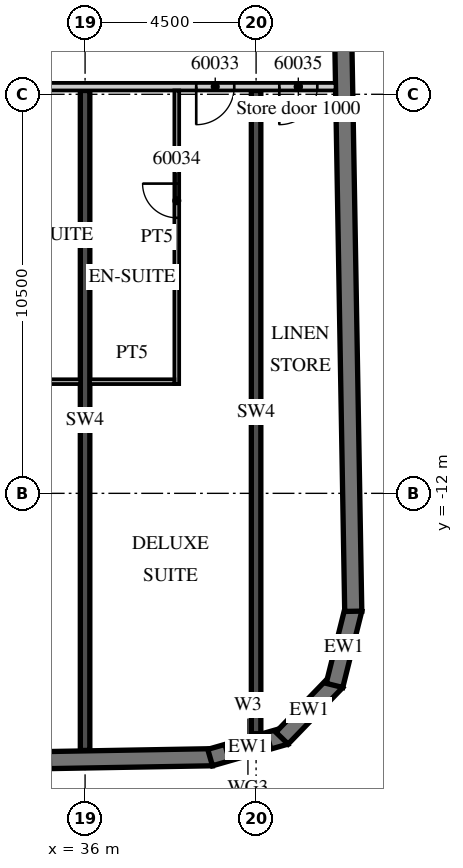
"""IFC4 building model, lengths in metres.
Left out: names, types, materials, properties, quantities, classifications, styles, units other than length and angle.
Written with IfcOpenShell. Run it as: python <this file> out.ifc"""

import sys

from ifc_helpers import new_model, si_unit, direction, frame, frame_2d, origin, place, context, subcontext, project, spatial, polyline, rectangle, outline, extrude, element, fill, save


model = new_model("IFC4")
c1 = context("Model", 3, precision=1e-05, world=origin(), true_north=direction((0.0, 1.0)))
c2 = subcontext(c1, "Body", "Model", "MODEL_VIEW")
j1 = project(units=[si_unit("LENGTHUNIT", "METRE"), si_unit("PLANEANGLEUNIT", "RADIAN")], contexts=[c1])
p1 = place(None, origin())
s1 = spatial("IfcSite", under=j1, at=p1, CompositionType="ELEMENT")
p2 = place(p1, origin())
s2 = spatial("IfcBuilding", under=s1, at=p2, CompositionType="ELEMENT")
p3 = place(p2, frame((0.0, 0.0, 244.1)))
s3 = spatial("IfcBuildingStorey", under=s2, at=p3, CompositionType="ELEMENT", Elevation=244.1)
p4 = place(p3, frame((36.0, -18.765, 0.0), z_axis=(0.0, 0.0, 1.0), x_axis=(0.0, 1.0, 0.0)))
e1 = element("IfcWall", 1, at=p4, inside=s3, PredefinedType="SHEAR", context=c2, shape_type="SweptSolid", body=[
    extrude(rectangle(XDim=17.365, YDim=0.25, at=frame_2d((8.683, 0.0))), origin(), (0.0, 0.0, 1.0), 3.3),
])
p5 = place(p3, frame((40.5, -18.325, 0.0), z_axis=(0.0, 0.0, 1.0), x_axis=(0.0, 1.0, 0.0)))
e2 = element("IfcWall", 2, at=p5, inside=s3, PredefinedType="SHEAR", context=c2, shape_type="SweptSolid", body=[
    extrude(rectangle(XDim=16.925, YDim=0.25, at=frame_2d((8.463, 0.0))), origin(), (0.0, 0.0, 1.0), 3.3),
])
p6 = place(p3, frame((-13.504, -19.866, 0.0), z_axis=(0.0, 0.0, 1.0), x_axis=(0.999847672978, 0.017453676992, 0.0)))
e3 = element("IfcWall", 3, at=p6, inside=s3, PredefinedType="SOLIDWALL", context=c2, shape_type="SweptSolid", body=[
    extrude(rectangle(XDim=52.86, YDim=0.45, at=frame_2d((26.43, 0.0))), origin(), (0.0, 0.0, 1.0), 3.02),
])
p7 = place(p6, frame((0.9, 0.0, 0.45)))
e4 = element("IfcOpeningElement", 4, at=p7, cuts=e3, PredefinedType="OPENING", context=c2, shape_type="SweptSolid", body=[
    extrude(rectangle(XDim=2.7, YDim=2.25, at=frame_2d((1.35, 1.125))), frame((0.0, 0.235, 0.0), z_axis=(0.0, -1.0, 0.0), x_axis=(1.0, 0.0, 0.0)), (0.0, 0.0, 1.0), 0.47),
])
p8 = place(p6, frame((5.401, 0.0, 0.45)))
e5 = element("IfcOpeningElement", 5, at=p8, cuts=e3, PredefinedType="OPENING", context=c2, shape_type="SweptSolid", body=[
    extrude(rectangle(XDim=2.7, YDim=2.25, at=frame_2d((1.35, 1.125))), frame((0.0, 0.235, 0.0), z_axis=(0.0, -1.0, 0.0), x_axis=(1.0, 0.0, 0.0)), (0.0, 0.0, 1.0), 0.47),
])
p9 = place(p6, frame((9.902, 0.0, 0.45)))
e6 = element("IfcOpeningElement", 6, at=p9, cuts=e3, PredefinedType="OPENING", context=c2, shape_type="SweptSolid", body=[
    extrude(rectangle(XDim=2.7, YDim=2.25, at=frame_2d((1.35, 1.125))), frame((0.0, 0.235, 0.0), z_axis=(0.0, -1.0, 0.0), x_axis=(1.0, 0.0, 0.0)), (0.0, 0.0, 1.0), 0.47),
])
p10 = place(p6, frame((14.402, 0.0, 0.45)))
e7 = element("IfcOpeningElement", 7, at=p10, cuts=e3, PredefinedType="OPENING", context=c2, shape_type="SweptSolid", body=[
    extrude(rectangle(XDim=2.7, YDim=2.25, at=frame_2d((1.35, 1.125))), frame((0.0, 0.235, 0.0), z_axis=(0.0, -1.0, 0.0), x_axis=(1.0, 0.0, 0.0)), (0.0, 0.0, 1.0), 0.47),
])
p11 = place(p6, frame((18.903, 0.0, 0.45)))
e8 = element("IfcOpeningElement", 8, at=p11, cuts=e3, PredefinedType="OPENING", context=c2, shape_type="SweptSolid", body=[
    extrude(rectangle(XDim=2.7, YDim=2.25, at=frame_2d((1.35, 1.125))), frame((0.0, 0.235, 0.0), z_axis=(0.0, -1.0, 0.0), x_axis=(1.0, 0.0, 0.0)), (0.0, 0.0, 1.0), 0.47),
])
p12 = place(p6, frame((23.404, 0.0, 0.45)))
e9 = element("IfcOpeningElement", 9, at=p12, cuts=e3, PredefinedType="OPENING", context=c2, shape_type="SweptSolid", body=[
    extrude(rectangle(XDim=2.7, YDim=2.25, at=frame_2d((1.35, 1.125))), frame((0.0, 0.235, 0.0), z_axis=(0.0, -1.0, 0.0), x_axis=(1.0, 0.0, 0.0)), (0.0, 0.0, 1.0), 0.47),
])
p13 = place(p6, frame((27.904, 0.0, 0.45)))
e10 = element("IfcOpeningElement", 10, at=p13, cuts=e3, PredefinedType="OPENING", context=c2, shape_type="SweptSolid", body=[
    extrude(rectangle(XDim=2.7, YDim=2.25, at=frame_2d((1.35, 1.125))), frame((0.0, 0.235, 0.0), z_axis=(0.0, -1.0, 0.0), x_axis=(1.0, 0.0, 0.0)), (0.0, 0.0, 1.0), 0.47),
])
p14 = place(p6, frame((32.405, 0.0, 0.45)))
e11 = element("IfcOpeningElement", 11, at=p14, cuts=e3, PredefinedType="OPENING", context=c2, shape_type="SweptSolid", body=[
    extrude(rectangle(XDim=2.7, YDim=2.25, at=frame_2d((1.35, 1.125))), frame((0.0, 0.235, 0.0), z_axis=(0.0, -1.0, 0.0), x_axis=(1.0, 0.0, 0.0)), (0.0, 0.0, 1.0), 0.47),
])
p15 = place(p6, frame((36.906, 0.0, 0.45)))
e12 = element("IfcOpeningElement", 12, at=p15, cuts=e3, PredefinedType="OPENING", context=c2, shape_type="SweptSolid", body=[
    extrude(rectangle(XDim=2.7, YDim=2.25, at=frame_2d((1.35, 1.125))), frame((0.0, 0.235, 0.0), z_axis=(0.0, -1.0, 0.0), x_axis=(1.0, 0.0, 0.0)), (0.0, 0.0, 1.0), 0.47),
])
p16 = place(p6, frame((41.406, 0.0, 0.45)))
e13 = element("IfcOpeningElement", 13, at=p16, cuts=e3, PredefinedType="OPENING", context=c2, shape_type="SweptSolid", body=[
    extrude(rectangle(XDim=2.7, YDim=2.25, at=frame_2d((1.35, 1.125))), frame((0.0, 0.235, 0.0), z_axis=(0.0, -1.0, 0.0), x_axis=(1.0, 0.0, 0.0)), (0.0, 0.0, 1.0), 0.47),
])
p17 = place(p6, frame((45.907, 0.0, 0.45)))
e14 = element("IfcOpeningElement", 14, at=p17, cuts=e3, PredefinedType="OPENING", context=c2, shape_type="SweptSolid", body=[
    extrude(rectangle(XDim=2.7, YDim=2.25, at=frame_2d((1.35, 1.125))), frame((0.0, 0.235, 0.0), z_axis=(0.0, -1.0, 0.0), x_axis=(1.0, 0.0, 0.0)), (0.0, 0.0, 1.0), 0.47),
])
p18 = place(p3, frame((39.29, -18.952, 0.0), z_axis=(0.0, 0.0, 1.0), x_axis=(0.961247584925, 0.275686562016, 0.0)))
e15 = element("IfcWall", 15, at=p18, inside=s3, PredefinedType="SOLIDWALL", context=c2, shape_type="SweptSolid", body=[
    extrude(outline(polyline([(0.0, -0.225), (2.071, -0.225), (1.95, 0.225), (0.121, 0.225), (0.0, -0.225)])), origin(), (0.0, 0.0, 1.0), 3.02),
])
p19 = place(p18, frame((0.435, 0.0, 0.45)))
e16 = element("IfcOpeningElement", 16, at=p19, cuts=e15, PredefinedType="OPENING", context=c2, shape_type="SweptSolid", body=[
    extrude(rectangle(XDim=1.2, YDim=2.25, at=frame_2d((0.6, 1.125))), frame((0.0, 0.235, 0.0), z_axis=(0.0, -1.0, 0.0), x_axis=(1.0, 0.0, 0.0)), (0.0, 0.0, 1.0), 0.47),
])
p20 = place(p3, frame((41.181, -18.442, 0.0), z_axis=(0.0, 0.0, 1.0), x_axis=(0.694678672846, 0.719320193998, 0.0)))
e17 = element("IfcWall", 17, at=p20, inside=s3, PredefinedType="SOLIDWALL", context=c2, shape_type="SweptSolid", body=[
    extrude(outline(polyline([(0.0, -0.225), (2.071, -0.225), (1.95, 0.225), (0.121, 0.225), (0.0, -0.225)])), origin(), (0.0, 0.0, 1.0), 3.02),
])
p21 = place(p3, frame((42.563, -17.054, 0.0), z_axis=(0.0, 0.0, 1.0), x_axis=(0.241841950319, 0.970315655375, 0.0)))
e18 = element("IfcWall", 18, at=p21, inside=s3, PredefinedType="SOLIDWALL", context=c2, shape_type="SweptSolid", body=[
    extrude(outline(polyline([(0.0, -0.225), (2.071, -0.225), (1.95, 0.225), (0.121, 0.225), (0.0, -0.225)])), origin(), (0.0, 0.0, 1.0), 3.02),
])
p22 = place(p3, frame((43.057, -15.103, 0.0), z_axis=(0.0, 0.0, 1.0), x_axis=(-0.017452408953, 0.999847695112, 0.0)))
e19 = element("IfcWall", 19, at=p22, inside=s3, PredefinedType="SOLIDWALL", context=c2, shape_type="SweptSolid", body=[
    extrude(rectangle(XDim=33.0, YDim=0.45, at=frame_2d((16.5, 0.0))), origin(), (0.0, 0.0, 1.0), 3.02),
])
p23 = place(p3, frame((13.5, -1.3, 0.0), z_axis=(0.0, 0.0, 1.0), x_axis=(1.0, 0.0, 0.0)))
e20 = element("IfcWall", 20, at=p23, inside=s3, PredefinedType="PARTITIONING", context=c2, shape_type="SweptSolid", body=[
    extrude(rectangle(XDim=29.091, YDim=0.2, at=frame_2d((14.545, 0.0))), origin(), (0.0, 0.0, 1.0), 3.02),
])
p24 = place(p23, frame((0.575, 0.0, 0.0)))
e21 = element("IfcOpeningElement", 21, at=p24, cuts=e20, PredefinedType="OPENING", context=c2, shape_type="SweptSolid", body=[
    extrude(rectangle(XDim=1.0, YDim=2.1, at=frame_2d((0.5, 1.05))), frame((0.0, 0.11, 0.0), z_axis=(0.0, -1.0, 0.0), x_axis=(1.0, 0.0, 0.0)), (0.0, 0.0, 1.0), 0.22),
])
p25 = place(p23, frame((6.938, 0.0, 0.0)))
e22 = element("IfcOpeningElement", 22, at=p25, cuts=e20, PredefinedType="OPENING", context=c2, shape_type="SweptSolid", body=[
    extrude(rectangle(XDim=1.2, YDim=2.1, at=frame_2d((0.6, 1.05))), frame((0.0, 0.11, 0.0), z_axis=(0.0, -1.0, 0.0), x_axis=(1.0, 0.0, 0.0)), (0.0, 0.0, 1.0), 0.22),
])
p26 = place(p23, frame((15.938, 0.0, 0.0)))
e23 = element("IfcOpeningElement", 23, at=p26, cuts=e20, PredefinedType="OPENING", context=c2, shape_type="SweptSolid", body=[
    extrude(rectangle(XDim=1.2, YDim=2.1, at=frame_2d((0.6, 1.05))), frame((0.0, 0.11, 0.0), z_axis=(0.0, -1.0, 0.0), x_axis=(1.0, 0.0, 0.0)), (0.0, 0.0, 1.0), 0.22),
])
p27 = place(p23, frame((25.425, 0.0, 0.0)))
e24 = element("IfcOpeningElement", 24, at=p27, cuts=e20, PredefinedType="OPENING", context=c2, shape_type="SweptSolid", body=[
    extrude(rectangle(XDim=1.0, YDim=2.1, at=frame_2d((0.5, 1.05))), frame((0.0, 0.11, 0.0), z_axis=(0.0, -1.0, 0.0), x_axis=(1.0, 0.0, 0.0)), (0.0, 0.0, 1.0), 0.22),
])
p28 = place(p23, frame((27.611, 0.0, 0.0)))
e25 = element("IfcOpeningElement", 25, at=p28, cuts=e20, PredefinedType="OPENING", context=c2, shape_type="SweptSolid", body=[
    extrude(rectangle(XDim=1.0, YDim=2.4, at=frame_2d((0.5, 1.2))), frame((0.0, 0.11, 0.0), z_axis=(0.0, -1.0, 0.0), x_axis=(1.0, 0.0, 0.0)), (0.0, 0.0, 1.0), 0.22),
])
p29 = place(p3, frame((33.075, -9.062, 0.0), z_axis=(0.0, 0.0, 1.0), x_axis=(1.0, 0.0, 0.0)))
e26 = element("IfcWall", 26, at=p29, inside=s3, PredefinedType="PARTITIONING", context=c2, shape_type="SweptSolid", body=[
    extrude(rectangle(XDim=2.8, YDim=0.125, at=frame_2d((1.4, 0.0))), origin(), (0.0, 0.0, 1.0), 3.02),
])
p30 = place(p3, frame((38.413, -9.125, 0.0), z_axis=(0.0, 0.0, 1.0), x_axis=(0.0, 1.0, 0.0)))
e27 = element("IfcWall", 27, at=p30, inside=s3, PredefinedType="PARTITIONING", context=c2, shape_type="SweptSolid", body=[
    extrude(rectangle(XDim=7.725, YDim=0.125, at=frame_2d((3.863, 0.0))), origin(), (0.0, 0.0, 1.0), 3.02),
])
p31 = place(p30, frame((4.375, 0.0, 0.0)))
e28 = element("IfcOpeningElement", 28, at=p31, cuts=e27, PredefinedType="OPENING", context=c2, shape_type="SweptSolid", body=[
    extrude(rectangle(XDim=0.9, YDim=2.1, at=frame_2d((0.45, 1.05))), frame((0.0, 0.073, 0.0), z_axis=(0.0, -1.0, 0.0), x_axis=(1.0, 0.0, 0.0)), (0.0, 0.0, 1.0), 0.145),
])
p32 = place(p3, frame((36.125, -9.062, 0.0), z_axis=(0.0, 0.0, 1.0), x_axis=(1.0, 0.0, 0.0)))
e29 = element("IfcWall", 29, at=p32, inside=s3, PredefinedType="PARTITIONING", context=c2, shape_type="SweptSolid", body=[
    extrude(rectangle(XDim=2.225, YDim=0.125, at=frame_2d((1.113, 0.0))), origin(), (0.0, 0.0, 1.0), 3.02),
])
p33 = place(p19, origin())
e30 = element("IfcWindow", 30, at=p33, inside=s3, PartitioningType="SINGLE_PANEL", PredefinedType="WINDOW", context=c2, shape_type="SweptSolid", body=[
    extrude(rectangle(XDim=1.2, YDim=2.25, at=frame_2d((0.6, 1.125))), frame((0.0, 0.09, 0.0), z_axis=(0.0, -1.0, 0.0), x_axis=(1.0, 0.0, 0.0)), (0.0, 0.0, 1.0), 0.06),
])
fill(e16, e30)
p34 = place(p27, origin())
e31 = element("IfcDoor", 31, at=p34, inside=s3, OperationType="SINGLE_SWING_LEFT", PredefinedType="DOOR", context=c2, shape_type="SweptSolid", body=[
    extrude(rectangle(XDim=1.0, YDim=2.1, at=frame_2d((0.5, 1.05))), frame((0.0, 0.025, 0.0), z_axis=(0.0, -1.0, 0.0), x_axis=(1.0, 0.0, 0.0)), (0.0, 0.0, 1.0), 0.05),
])
fill(e24, e31)
p35 = place(p31, origin())
e32 = element("IfcDoor", 32, at=p35, inside=s3, OperationType="SINGLE_SWING_RIGHT", PredefinedType="DOOR", context=c2, shape_type="SweptSolid", body=[
    extrude(rectangle(XDim=0.9, YDim=2.1, at=frame_2d((0.45, 1.05))), frame((0.0, 0.025, 0.0), z_axis=(0.0, -1.0, 0.0), x_axis=(1.0, 0.0, 0.0)), (0.0, 0.0, 1.0), 0.05),
])
fill(e28, e32)
p36 = place(p28, origin())
e33 = element("IfcDoor", 33, at=p36, inside=s3, OperationType="SINGLE_SWING_LEFT", PredefinedType="DOOR", context=c2, shape_type="SweptSolid", body=[
    extrude(rectangle(XDim=1.0, YDim=2.4, at=frame_2d((0.5, 1.2))), frame((0.0, 0.025, 0.0), z_axis=(0.0, -1.0, 0.0), x_axis=(1.0, 0.0, 0.0)), (0.0, 0.0, 1.0), 0.05),
])
fill(e25, e33)
save(model, sys.argv[1])
